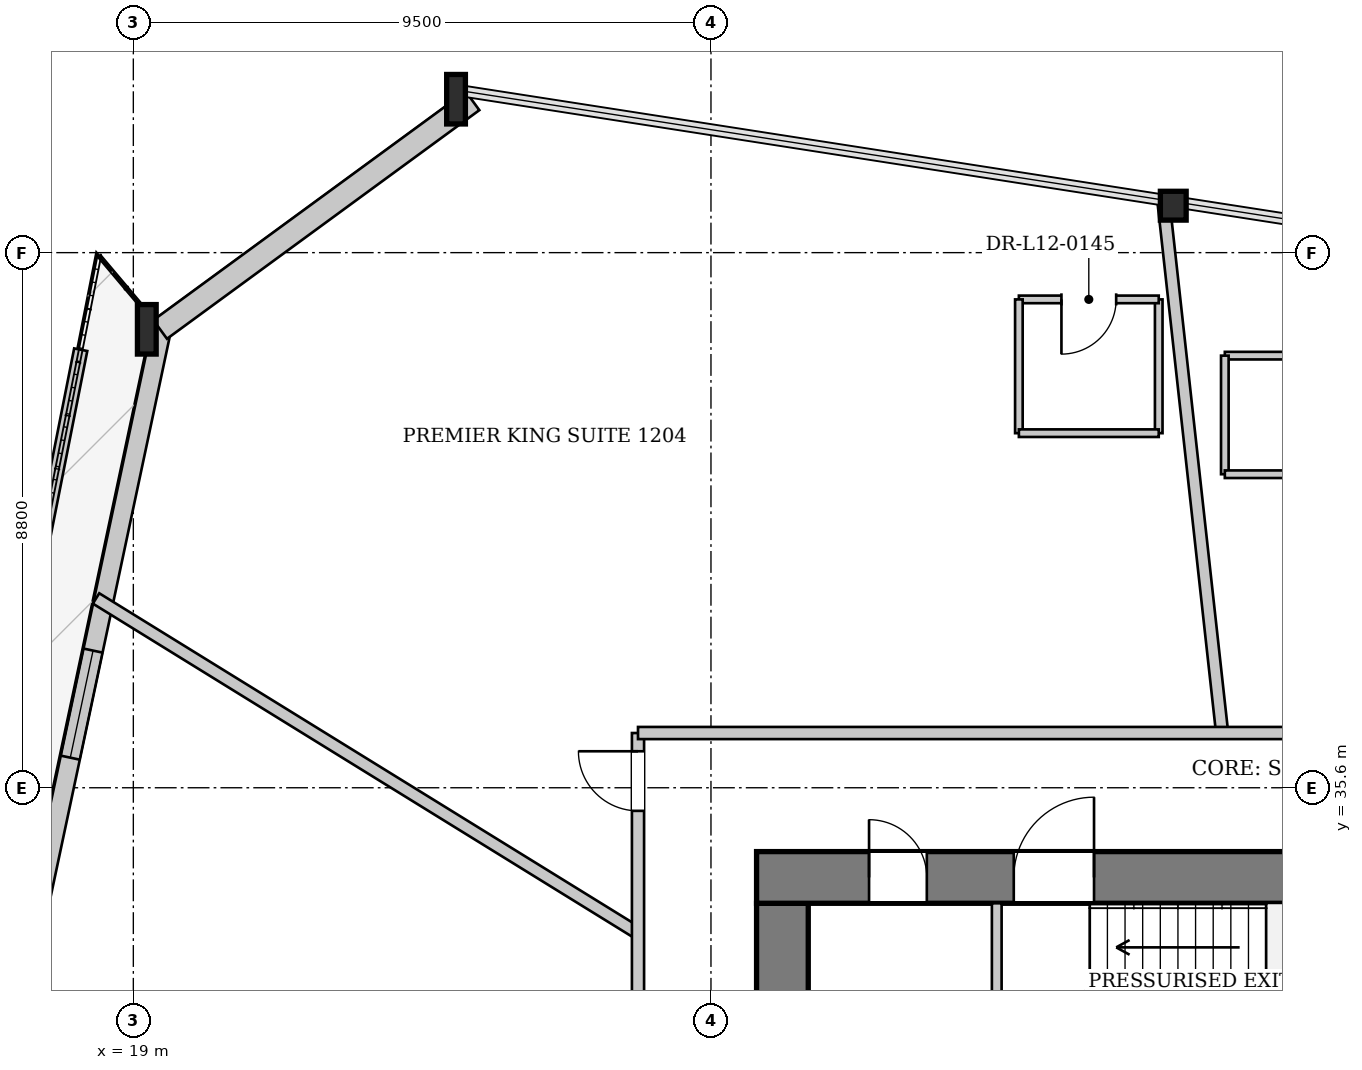
"""IFC4 building model, lengths in metres.
Left out: names, types, materials, properties, quantities, classifications, styles, units other than length and angle.
Written with IfcOpenShell. Run it as: python <this file> out.ifc"""

import sys

from ifc_helpers import new_model, si_unit, direction, frame, frame_2d, origin, origin_2d, place, context, subcontext, project, spatial, rectangle, i_section, extrude, source, transform, mapped, element, fill, save


model = new_model("IFC4")
c1 = context("Model", 3, precision=1e-05, world=origin(), true_north=direction((0.0, 1.0)))
c2 = subcontext(c1, "Body", "Model", "MODEL_VIEW")
j1 = project(units=[si_unit("LENGTHUNIT", "METRE"), si_unit("PLANEANGLEUNIT", "RADIAN")], contexts=[c1])
p1 = place(None, origin())
s1 = spatial("IfcSite", under=j1, at=p1, CompositionType="ELEMENT")
p2 = place(p1, origin())
s2 = spatial("IfcBuilding", under=s1, at=p2, CompositionType="ELEMENT")
p3 = place(p2, frame((0.0, 0.0, 50.6)))
s3 = spatial("IfcBuildingStorey", under=s2, at=p3, CompositionType="ELEMENT", Elevation=50.6)
m1 = source(origin(), c2, "Body", "SweptSolid", [
    extrude(i_section(OverallWidth=0.424, OverallDepth=0.474, WebThickness=0.043, FlangeThickness=0.068, at=origin_2d()), origin(), (0.0, 0.0, 1.0), 3.4),
])
p4 = place(p3, frame((36.258, 45.216, 0.0), z_axis=(-0.091042808567, -0.025848115997, 0.995511467492), x_axis=(0.273117540335, -0.961980669848, 0.0)))
e1 = element("IfcColumn", 1, at=p4, inside=s3, PredefinedType="COLUMN", context=c2, shape_type="MappedRepresentation", body=[
    mapped(m1, transform((0.0, 0.0, 0.0), x_axis=(1.0, 0.0, 0.0), y_axis=(0.0, 1.0, 0.0), z_axis=(0.0, 0.0, 1.0), scale=1.0)),
])
m2 = source(origin(), c2, "Body", "SweptSolid", [
    extrude(i_section(OverallWidth=0.308, OverallDepth=0.814, WebThickness=0.021, FlangeThickness=0.04, at=origin_2d()), origin(), (0.0, 0.0, 1.0), 3.409),
])
p5 = place(p3, frame((24.466, 47.05, 0.0), z_axis=(-0.093235557277, -0.074330651654, 0.992865592658), x_axis=(0.623375866329, -0.781922329441, 0.0)))
e2 = element("IfcColumn", 2, at=p5, inside=s3, PredefinedType="COLUMN", context=c2, shape_type="MappedRepresentation", body=[
    mapped(m2, transform((0.0, 0.0, 0.0), x_axis=(1.0, 0.0, 0.0), y_axis=(0.0, 1.0, 0.0), z_axis=(0.0, 0.0, 1.0), scale=1.0)),
])
m3 = source(origin(), c2, "Body", "SweptSolid", [
    extrude(i_section(OverallWidth=0.308, OverallDepth=0.814, WebThickness=0.021, FlangeThickness=0.04, at=origin_2d()), origin(), (0.0, 0.0, 1.0), 3.405),
])
p6 = place(p3, frame((19.329, 43.29, 0.0), z_axis=(-0.063307147293, -0.088543971582, 0.994058433996), x_axis=(0.81346635403, -0.581611976201, 0.0)))
e3 = element("IfcColumn", 3, at=p6, inside=s3, PredefinedType="COLUMN", context=c2, shape_type="MappedRepresentation", body=[
    mapped(m3, transform((0.0, 0.0, 0.0), x_axis=(1.0, 0.0, 0.0), y_axis=(0.0, 1.0, 0.0), z_axis=(0.0, 0.0, 1.0), scale=1.0)),
])
p7 = place(p3, frame((15.629, 25.117, 0.0), z_axis=(0.0, 0.0, 1.0), x_axis=(0.207965348846, 0.97813619383, 0.0)))
e4 = element("IfcWall", 4, at=p7, inside=s3, PredefinedType="SOLIDWALL", context=c2, shape_type="SweptSolid", body=[
    extrude(rectangle(XDim=18.545, YDim=0.32, at=frame_2d((9.272, 0.0))), origin(), (0.0, 0.0, 1.0), 2.592),
])
p8 = place(p7, frame((5.384, 0.0, 0.0)))
e5 = element("IfcOpeningElement", 5, at=p8, cuts=e4, PredefinedType="OPENING", context=c2, shape_type="SweptSolid", body=[
    extrude(rectangle(XDim=1.1, YDim=2.3, at=frame_2d((0.55, 1.15))), frame((0.0, 0.17, 0.0), z_axis=(0.0, -1.0, 0.0), x_axis=(1.0, 0.0, 0.0)), (0.0, 0.0, 1.0), 0.34),
])
p9 = place(p7, frame((11.223, 0.0, 0.272)))
e6 = element("IfcOpeningElement", 6, at=p9, cuts=e4, PredefinedType="OPENING", context=c2, shape_type="SweptSolid", body=[
    extrude(rectangle(XDim=1.8, YDim=2.2, at=frame_2d((0.9, 1.1))), frame((0.0, 0.17, 0.0), z_axis=(0.0, -1.0, 0.0), x_axis=(1.0, 0.0, 0.0)), (0.0, 0.0, 1.0), 0.34),
])
p10 = place(p3, frame((19.441, 43.136, 0.0), z_axis=(0.0, 0.0, 1.0), x_axis=(0.806936258976, 0.590638530702, 0.0)))
e7 = element("IfcWall", 7, at=p10, inside=s3, PredefinedType="SOLIDWALL", context=c2, shape_type="SweptSolid", body=[
    extrude(rectangle(XDim=6.366, YDim=0.38, at=frame_2d((3.183, 0.0))), origin(), (0.0, 0.0, 1.0), 2.592),
])
p11 = place(p3, frame((18.135, 42.804, 0.0), z_axis=(0.0, 0.0, 1.0), x_axis=(-0.194176334872, -0.980966641113, 0.0)))
e8 = element("IfcWall", 8, at=p11, inside=s3, PredefinedType="PARAPET", context=c2, shape_type="SweptSolid", body=[
    extrude(rectangle(XDim=16.486, YDim=0.22, at=frame_2d((8.243, 0.0))), origin(), (0.0, 0.0, 1.0), 0.3),
])
p12 = place(p3, frame((29.675, 19.5, 0.0), z_axis=(0.0, 0.0, 1.0), x_axis=(0.0, 1.0, 0.0)))
e9 = element("IfcWall", 9, at=p12, inside=s3, PredefinedType="SHEAR", context=c2, shape_type="SweptSolid", body=[
    extrude(rectangle(XDim=14.2, YDim=0.85, at=frame_2d((7.1, 0.0))), origin(), (0.0, 0.0, 1.0), 3.3),
])
p13 = place(p12, frame((7.42, 0.0, 0.0)))
e10 = element("IfcOpeningElement", 10, at=p13, cuts=e9, PredefinedType="OPENING", context=c2, shape_type="SweptSolid", body=[
    extrude(rectangle(XDim=1.6, YDim=2.2, at=frame_2d((0.8, 1.1))), frame((0.0, 0.435, 0.0), z_axis=(0.0, -1.0, 0.0), x_axis=(1.0, 0.0, 0.0)), (0.0, 0.0, 1.0), 0.87),
])
p14 = place(p3, frame((29.25, 34.125, 0.0), z_axis=(0.0, 0.0, 1.0), x_axis=(1.0, 0.0, 0.0)))
e11 = element("IfcWall", 11, at=p14, inside=s3, PredefinedType="SHEAR", context=c2, shape_type="SweptSolid", body=[
    extrude(rectangle(XDim=17.5, YDim=0.85, at=frame_2d((8.75, 0.0))), origin(), (0.0, 0.0, 1.0), 3.3),
])
p15 = place(p14, frame((1.85, 0.0, 0.0)))
e12 = element("IfcOpeningElement", 12, at=p15, cuts=e11, PredefinedType="OPENING", context=c2, shape_type="SweptSolid", body=[
    extrude(rectangle(XDim=0.95, YDim=2.1, at=frame_2d((0.475, 1.05))), frame((0.0, 0.435, 0.0), z_axis=(0.0, -1.0, 0.0), x_axis=(1.0, 0.0, 0.0)), (0.0, 0.0, 1.0), 0.87),
])
p16 = place(p14, frame((4.23, 0.0, 0.0)))
e13 = element("IfcOpeningElement", 13, at=p16, cuts=e11, PredefinedType="OPENING", context=c2, shape_type="SweptSolid", body=[
    extrude(rectangle(XDim=1.32, YDim=2.2, at=frame_2d((0.66, 1.1))), frame((0.0, 0.435, 0.0), z_axis=(0.0, -1.0, 0.0), x_axis=(1.0, 0.0, 0.0)), (0.0, 0.0, 1.0), 0.87),
])
p17 = place(p14, frame((15.3, 0.0, 0.0)))
e14 = element("IfcOpeningElement", 14, at=p17, cuts=e11, PredefinedType="OPENING", context=c2, shape_type="SweptSolid", body=[
    extrude(rectangle(XDim=0.95, YDim=2.1, at=frame_2d((0.475, 1.05))), frame((0.0, 0.435, 0.0), z_axis=(0.0, -1.0, 0.0), x_axis=(1.0, 0.0, 0.0)), (0.0, 0.0, 1.0), 0.87),
])
p18 = place(p3, frame((33.2, 28.44, 0.0), z_axis=(0.0, 0.0, 1.0), x_axis=(0.0, 1.0, 0.0)))
e15 = element("IfcWall", 15, at=p18, inside=s3, PredefinedType="PARTITIONING", context=c2, shape_type="SweptSolid", body=[
    extrude(rectangle(XDim=5.26, YDim=0.16, at=frame_2d((2.63, 0.0))), origin(), (0.0, 0.0, 1.0), 3.3),
])
p19 = place(p3, frame((36.907, 36.5, 0.0), z_axis=(0.0, 0.0, 1.0), x_axis=(-0.109739318289, 0.993960402643, 0.0)))
e16 = element("IfcWall", 16, at=p19, inside=s3, PredefinedType="PARTITIONING", context=c2, shape_type="SweptSolid", body=[
    extrude(rectangle(XDim=8.788, YDim=0.2, at=frame_2d((4.394, 0.0))), origin(), (0.0, 0.0, 1.0), 3.3),
])
p20 = place(p3, frame((27.3, 33.208, 0.0), z_axis=(0.0, 0.0, 1.0), x_axis=(-0.850809029341, 0.525475018998, 0.0)))
e17 = element("IfcWall", 17, at=p20, inside=s3, PredefinedType="PARTITIONING", context=c2, shape_type="SweptSolid", body=[
    extrude(rectangle(XDim=10.476, YDim=0.2, at=frame_2d((5.238, 0.0))), origin(), (0.0, 0.0, 1.0), 3.3),
])
p21 = place(p3, frame((39.351, 42.706, 0.0), z_axis=(0.0, 0.0, 1.0), x_axis=(-1.0, 0.0, 0.0)))
e18 = element("IfcWall", 18, at=p21, inside=s3, PredefinedType="PARTITIONING", context=c2, shape_type="SweptSolid", body=[
    extrude(rectangle(XDim=2.4, YDim=0.125, at=frame_2d((1.2, 0.0))), origin(), (0.0, 0.0, 1.0), 3.3),
])
p22 = place(p3, frame((36.951, 42.706, 0.0), z_axis=(0.0, 0.0, 1.0), x_axis=(0.0, -1.0, 0.0)))
e19 = element("IfcWall", 19, at=p22, inside=s3, PredefinedType="PARTITIONING", context=c2, shape_type="SweptSolid", body=[
    extrude(rectangle(XDim=1.95, YDim=0.125, at=frame_2d((0.975, 0.0))), origin(), (0.0, 0.0, 1.0), 3.3),
])
p23 = place(p3, frame((36.951, 40.756, 0.0), z_axis=(0.0, 0.0, 1.0), x_axis=(1.0, 0.0, 0.0)))
e20 = element("IfcWall", 20, at=p23, inside=s3, PredefinedType="PARTITIONING", context=c2, shape_type="SweptSolid", body=[
    extrude(rectangle(XDim=2.4, YDim=0.125, at=frame_2d((1.2, 0.0))), origin(), (0.0, 0.0, 1.0), 3.3),
])
p24 = place(p3, frame((35.864, 41.431, 0.0), z_axis=(0.0, 0.0, 1.0), x_axis=(0.0, 1.0, 0.0)))
e21 = element("IfcWall", 21, at=p24, inside=s3, PredefinedType="PARTITIONING", context=c2, shape_type="SweptSolid", body=[
    extrude(rectangle(XDim=2.2, YDim=0.125, at=frame_2d((1.1, 0.0))), origin(), (0.0, 0.0, 1.0), 3.3),
])
p25 = place(p3, frame((35.864, 43.631, 0.0), z_axis=(0.0, 0.0, 1.0), x_axis=(-1.0, 0.0, 0.0)))
e22 = element("IfcWall", 22, at=p25, inside=s3, PredefinedType="PARTITIONING", context=c2, shape_type="SweptSolid", body=[
    extrude(rectangle(XDim=2.3, YDim=0.125, at=frame_2d((1.15, 0.0))), origin(), (0.0, 0.0, 1.0), 3.3),
])
p26 = place(p25, frame((0.7, 0.0, 0.0)))
e23 = element("IfcOpeningElement", 23, at=p26, cuts=e22, PredefinedType="OPENING", context=c2, shape_type="SweptSolid", body=[
    extrude(rectangle(XDim=0.9, YDim=2.1, at=frame_2d((0.45, 1.05))), frame((0.0, 0.073, 0.0), z_axis=(0.0, -1.0, 0.0), x_axis=(1.0, 0.0, 0.0)), (0.0, 0.0, 1.0), 0.145),
])
p27 = place(p3, frame((33.564, 43.631, 0.0), z_axis=(0.0, 0.0, 1.0), x_axis=(0.0, -1.0, 0.0)))
e24 = element("IfcWall", 24, at=p27, inside=s3, PredefinedType="PARTITIONING", context=c2, shape_type="SweptSolid", body=[
    extrude(rectangle(XDim=2.2, YDim=0.125, at=frame_2d((1.1, 0.0))), origin(), (0.0, 0.0, 1.0), 3.3),
])
p28 = place(p3, frame((33.564, 41.431, 0.0), z_axis=(0.0, 0.0, 1.0), x_axis=(1.0, 0.0, 0.0)))
e25 = element("IfcWall", 25, at=p28, inside=s3, PredefinedType="PARTITIONING", context=c2, shape_type="SweptSolid", body=[
    extrude(rectangle(XDim=2.3, YDim=0.125, at=frame_2d((1.15, 0.0))), origin(), (0.0, 0.0, 1.0), 3.3),
])
p29 = place(p3, frame((27.3, 16.7, 0.0), z_axis=(0.0, 0.0, 1.0), x_axis=(0.0, 1.0, 0.0)))
e26 = element("IfcWall", 26, at=p29, inside=s3, PredefinedType="PARTITIONING", context=c2, shape_type="SweptSolid", body=[
    extrude(rectangle(XDim=19.8, YDim=0.2, at=frame_2d((9.9, 0.0))), origin(), (0.0, 0.0, 1.0), 3.3),
])
p30 = place(p29, frame((18.52, 0.0, 0.0)))
e27 = element("IfcOpeningElement", 27, at=p30, cuts=e26, PredefinedType="OPENING", context=c2, shape_type="SweptSolid", body=[
    extrude(rectangle(XDim=0.98, YDim=2.15, at=frame_2d((0.49, 1.075))), frame((0.0, 0.11, 0.0), z_axis=(0.0, -1.0, 0.0), x_axis=(1.0, 0.0, 0.0)), (0.0, 0.0, 1.0), 0.22),
])
p31 = place(p29, frame((12.028, 0.0, 0.0)))
e28 = element("IfcOpeningElement", 28, at=p31, cuts=e26, PredefinedType="OPENING", context=c2, shape_type="SweptSolid", body=[
    extrude(rectangle(XDim=0.98, YDim=2.15, at=frame_2d((0.49, 1.075))), frame((0.0, 0.11, 0.0), z_axis=(0.0, -1.0, 0.0), x_axis=(1.0, 0.0, 0.0)), (0.0, 0.0, 1.0), 0.22),
])
p32 = place(p3, frame((27.3, 36.5, 0.0), z_axis=(0.0, 0.0, 1.0), x_axis=(1.0, 0.0, 0.0)))
e29 = element("IfcWall", 29, at=p32, inside=s3, PredefinedType="PARTITIONING", context=c2, shape_type="SweptSolid", body=[
    extrude(rectangle(XDim=21.4, YDim=0.2, at=frame_2d((10.7, 0.0))), origin(), (0.0, 0.0, 1.0), 3.3),
])
p33 = place(p32, frame((16.992, 0.0, 0.0)))
e30 = element("IfcOpeningElement", 30, at=p33, cuts=e29, PredefinedType="OPENING", context=c2, shape_type="SweptSolid", body=[
    extrude(rectangle(XDim=0.98, YDim=2.15, at=frame_2d((0.49, 1.075))), frame((0.0, 0.11, 0.0), z_axis=(0.0, -1.0, 0.0), x_axis=(1.0, 0.0, 0.0)), (0.0, 0.0, 1.0), 0.22),
])
m4 = source(origin(), c2, "Body", "SweptSolid", [
    extrude(rectangle(XDim=1.8, YDim=2.2, at=frame_2d((0.9, 1.1))), frame((0.0, 0.03, 0.0), z_axis=(0.0, -1.0, 0.0), x_axis=(1.0, 0.0, 0.0)), (0.0, 0.0, 1.0), 0.06),
])
p34 = place(p9, origin())
e31 = element("IfcWindow", 31, at=p34, inside=s3, PartitioningType="SINGLE_PANEL", PredefinedType="WINDOW", context=c2, shape_type="MappedRepresentation", body=[
    mapped(m4, transform((0.0, 0.0, 0.0), x_axis=(1.0, 0.0, 0.0), y_axis=(0.0, 1.0, 0.0), z_axis=(0.0, 0.0, 1.0), scale=1.0)),
])
fill(e6, e31)
m5 = source(origin(), c2, "Body", "SweptSolid", [
    extrude(rectangle(XDim=0.95, YDim=2.1, at=frame_2d((0.475, 1.05))), frame((0.0, 0.025, 0.0), z_axis=(0.0, -1.0, 0.0), x_axis=(1.0, 0.0, 0.0)), (0.0, 0.0, 1.0), 0.05),
])
p35 = place(p15, origin())
e32 = element("IfcDoor", 32, at=p35, inside=s3, OperationType="SINGLE_SWING_LEFT", PredefinedType="DOOR", context=c2, shape_type="MappedRepresentation", body=[
    mapped(m5, transform((0.0, 0.0, 0.0), x_axis=(1.0, 0.0, 0.0), y_axis=(0.0, 1.0, 0.0), z_axis=(0.0, 0.0, 1.0), scale=1.0)),
])
fill(e12, e32)
m6 = source(origin(), c2, "Body", "SweptSolid", [
    extrude(rectangle(XDim=1.32, YDim=2.2, at=frame_2d((0.66, 1.1))), frame((0.0, 0.025, 0.0), z_axis=(0.0, -1.0, 0.0), x_axis=(1.0, 0.0, 0.0)), (0.0, 0.0, 1.0), 0.05),
])
p36 = place(p16, origin())
e33 = element("IfcDoor", 33, at=p36, inside=s3, OperationType="SINGLE_SWING_RIGHT", PredefinedType="DOOR", context=c2, shape_type="MappedRepresentation", body=[
    mapped(m6, transform((0.0, 0.0, 0.0), x_axis=(1.0, 0.0, 0.0), y_axis=(0.0, 1.0, 0.0), z_axis=(0.0, 0.0, 1.0), scale=1.0)),
])
fill(e13, e33)
m7 = source(origin(), c2, "Body", "SweptSolid", [
    extrude(rectangle(XDim=0.9, YDim=2.1, at=frame_2d((0.45, 1.05))), frame((0.0, 0.025, 0.0), z_axis=(0.0, -1.0, 0.0), x_axis=(1.0, 0.0, 0.0)), (0.0, 0.0, 1.0), 0.05),
])
p37 = place(p26, origin())
e34 = element("IfcDoor", 34, at=p37, inside=s3, OperationType="SINGLE_SWING_RIGHT", PredefinedType="DOOR", context=c2, shape_type="MappedRepresentation", body=[
    mapped(m7, transform((0.0, 0.0, 0.0), x_axis=(1.0, 0.0, 0.0), y_axis=(0.0, 1.0, 0.0), z_axis=(0.0, 0.0, 1.0), scale=1.0)),
])
fill(e23, e34)
m8 = source(origin(), c2, "Body", "SweptSolid", [
    extrude(rectangle(XDim=0.98, YDim=2.15, at=frame_2d((0.49, 1.075))), frame((0.0, 0.025, 0.0), z_axis=(0.0, -1.0, 0.0), x_axis=(1.0, 0.0, 0.0)), (0.0, 0.0, 1.0), 0.05),
])
p38 = place(p30, origin())
e35 = element("IfcDoor", 35, at=p38, inside=s3, OperationType="SINGLE_SWING_RIGHT", PredefinedType="DOOR", context=c2, shape_type="MappedRepresentation", body=[
    mapped(m8, transform((0.0, 0.0, 0.0), x_axis=(1.0, 0.0, 0.0), y_axis=(0.0, 1.0, 0.0), z_axis=(0.0, 0.0, 1.0), scale=1.0)),
])
fill(e27, e35)
save(model, sys.argv[1])
